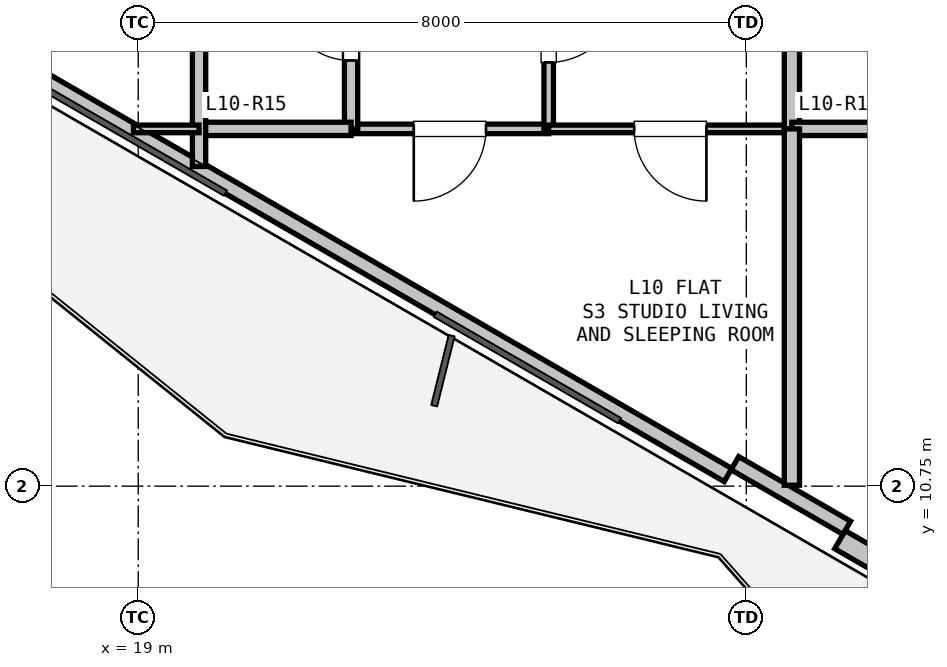
"""IFC4 building model, lengths in metres.
Left out: names, types, materials, properties, quantities, classifications, styles, units other than length and angle.
Written with IfcOpenShell. Run it as: python <this file> out.ifc"""

import sys

from ifc_helpers import new_model, si_unit, direction, frame, frame_2d, origin, place, context, subcontext, project, spatial, rectangle, extrude, element, fill, save


model = new_model("IFC4")
c1 = context("Model", 3, precision=1e-05, world=origin(), true_north=direction((0.0, 1.0)))
c2 = subcontext(c1, "Body", "Model", "MODEL_VIEW")
j1 = project(units=[si_unit("LENGTHUNIT", "METRE"), si_unit("PLANEANGLEUNIT", "RADIAN")], contexts=[c1])
p1 = place(None, origin())
s1 = spatial("IfcSite", under=j1, at=p1, CompositionType="ELEMENT")
p2 = place(p1, origin())
s2 = spatial("IfcBuilding", under=s1, at=p2, CompositionType="ELEMENT")
p3 = place(p2, frame((0.0, 0.0, 39.0)))
s3 = spatial("IfcBuildingStorey", under=s2, at=p3, CompositionType="ELEMENT", Elevation=39.0)
p4 = place(p3, frame((39.207, 3.71, 0.0), z_axis=(0.0, 0.0, 1.0), x_axis=(-0.86603192154, 0.499988710747, 0.0)))
e1 = element("IfcWall", 1, at=p4, inside=s3, PredefinedType="SOLIDWALL", context=c2, shape_type="SweptSolid", body=[
    extrude(rectangle(XDim=12.673, YDim=0.275, at=frame_2d((6.336, 0.0))), origin(), (0.0, 0.0, 1.0), 2.66),
])
p5 = place(p4, frame((8.136, 0.0, 0.0)))
e2 = element("IfcOpeningElement", 2, at=p5, cuts=e1, PredefinedType="OPENING", context=c2, shape_type="SweptSolid", body=[
    extrude(rectangle(XDim=1.1, YDim=2.1, at=frame_2d((0.55, 1.05))), frame((0.0, 0.147, 0.0), z_axis=(0.0, -1.0, 0.0), x_axis=(1.0, 0.0, 0.0)), (0.0, 0.0, 1.0), 0.295),
])
p6 = place(p4, frame((2.971, 0.0, 0.9)))
e3 = element("IfcOpeningElement", 3, at=p6, cuts=e1, PredefinedType="OPENING", context=c2, shape_type="SweptSolid", body=[
    extrude(rectangle(XDim=1.2, YDim=1.4, at=frame_2d((0.6, 0.7))), frame((0.0, 0.147, 0.0), z_axis=(0.0, -1.0, 0.0), x_axis=(1.0, 0.0, 0.0)), (0.0, 0.0, 1.0), 0.295),
])
p7 = place(p3, frame((26.76, 10.896, 0.0), z_axis=(0.0, 0.0, 1.0), x_axis=(-0.866027351828, 0.499996625875, 0.0)))
e4 = element("IfcWall", 4, at=p7, inside=s3, PredefinedType="PARAPET", context=c2, shape_type="SweptSolid", body=[
    extrude(rectangle(XDim=11.973, YDim=0.2, at=frame_2d((5.987, 0.0))), origin(), (0.0, 0.0, 1.0), 0.2),
])
p8 = place(p3, frame((28.322, 10.202, 0.0), z_axis=(0.0, 0.0, 1.0), x_axis=(-0.86605165483, 0.499954529098, 0.0)))
e5 = element("IfcWall", 5, at=p8, inside=s3, PredefinedType="PARAPET", context=c2, shape_type="SweptSolid", body=[
    extrude(rectangle(XDim=1.7, YDim=0.2, at=frame_2d((0.85, 0.0))), origin(), (0.0, 0.0, 1.0), 2.66),
])
p9 = place(p3, frame((24.4, 15.45, 0.0), z_axis=(0.0, 0.0, 1.0), x_axis=(-1.0, 0.0, 0.0)))
e6 = element("IfcWall", 6, at=p9, inside=s3, PredefinedType="PARTITIONING", context=c2, shape_type="SweptSolid", body=[
    extrude(rectangle(XDim=2.6, YDim=0.125, at=frame_2d((1.3, 0.0))), origin(), (0.0, 0.0, 1.0), 3.04),
])
p10 = place(p9, frame((0.825, 0.0, 0.0)))
e7 = element("IfcOpeningElement", 7, at=p10, cuts=e6, PredefinedType="OPENING", context=c2, shape_type="SweptSolid", body=[
    extrude(rectangle(XDim=0.95, YDim=2.1, at=frame_2d((0.475, 1.05))), frame((0.0, 0.073, 0.0), z_axis=(0.0, -1.0, 0.0), x_axis=(1.0, 0.0, 0.0)), (0.0, 0.0, 1.0), 0.145),
])
p11 = place(p3, frame((21.8, 15.45, 0.0), z_axis=(0.0, 0.0, 1.0), x_axis=(0.0, 1.0, 0.0)))
e8 = element("IfcWall", 8, at=p11, inside=s3, PredefinedType="PLUMBINGWALL", context=c2, shape_type="SweptSolid", body=[
    extrude(rectangle(XDim=2.7, YDim=0.175, at=frame_2d((1.35, 0.0))), origin(), (0.0, 0.0, 1.0), 3.04),
])
p12 = place(p11, frame((0.9, 0.0, 0.0)))
e9 = element("IfcOpeningElement", 9, at=p12, cuts=e8, PredefinedType="OPENING", context=c2, shape_type="SweptSolid", body=[
    extrude(rectangle(XDim=0.9, YDim=2.1, at=frame_2d((0.45, 1.05))), frame((0.0, 0.097, 0.0), z_axis=(0.0, -1.0, 0.0), x_axis=(1.0, 0.0, 0.0)), (0.0, 0.0, 1.0), 0.195),
])
p13 = place(p3, frame((24.4, 18.15, 0.0), z_axis=(0.0, 0.0, 1.0), x_axis=(0.0, -1.0, 0.0)))
e10 = element("IfcWall", 10, at=p13, inside=s3, PredefinedType="PARTITIONING", context=c2, shape_type="SweptSolid", body=[
    extrude(rectangle(XDim=2.7, YDim=0.125, at=frame_2d((1.35, 0.0))), origin(), (0.0, 0.0, 1.0), 2.337),
])
p14 = place(p13, frame((0.875, 0.0, 0.0)))
e11 = element("IfcOpeningElement", 11, at=p14, cuts=e10, PredefinedType="OPENING", context=c2, shape_type="SweptSolid", body=[
    extrude(rectangle(XDim=0.95, YDim=2.1, at=frame_2d((0.475, 1.05))), frame((0.0, 0.073, 0.0), z_axis=(0.0, -1.0, 0.0), x_axis=(1.0, 0.0, 0.0)), (0.0, 0.0, 1.0), 0.145),
])
p15 = place(p3, frame((21.8, 15.45, 0.0), z_axis=(0.0, 0.0, 1.0), x_axis=(-1.0, 0.0, 0.0)))
e12 = element("IfcWall", 12, at=p15, inside=s3, PredefinedType="PLUMBINGWALL", context=c2, shape_type="SweptSolid", body=[
    extrude(rectangle(XDim=2.0, YDim=0.175, at=frame_2d((1.0, 0.0))), origin(), (0.0, 0.0, 1.0), 2.365),
])
p16 = place(p3, frame((19.8, 14.956, 0.0), z_axis=(0.0, 0.0, 1.0), x_axis=(0.0, 1.0, 0.0)))
e13 = element("IfcWall", 13, at=p16, inside=s3, PredefinedType="PLUMBINGWALL", context=c2, shape_type="SweptSolid", body=[
    extrude(rectangle(XDim=3.194, YDim=0.175, at=frame_2d((1.597, 0.0))), origin(), (0.0, 0.0, 1.0), 2.365),
])
p17 = place(p3, frame((27.6, 15.45, 0.0), z_axis=(0.0, 0.0, 1.0), x_axis=(-1.0, 0.0, 0.0)))
e14 = element("IfcWall", 14, at=p17, inside=s3, PredefinedType="PARTITIONING", context=c2, shape_type="SweptSolid", body=[
    extrude(rectangle(XDim=3.2, YDim=0.1, at=frame_2d((1.6, 0.0))), origin(), (0.0, 0.0, 1.0), 2.337),
])
p18 = place(p17, frame((1.125, 0.0, 0.0)))
e15 = element("IfcOpeningElement", 15, at=p18, cuts=e14, PredefinedType="OPENING", context=c2, shape_type="SweptSolid", body=[
    extrude(rectangle(XDim=0.95, YDim=2.1, at=frame_2d((0.475, 1.05))), frame((0.0, 0.06, 0.0), z_axis=(0.0, -1.0, 0.0), x_axis=(1.0, 0.0, 0.0)), (0.0, 0.0, 1.0), 0.12),
])
p19 = place(p3, frame((27.6, 18.15, 0.0), z_axis=(0.0, 0.0, 1.0), x_axis=(0.0, -1.0, 0.0)))
e16 = element("IfcWall", 16, at=p19, inside=s3, PredefinedType="PARTITIONING", context=c2, shape_type="SweptSolid", body=[
    extrude(rectangle(XDim=2.7, YDim=0.2, at=frame_2d((1.35, 0.0))), origin(), (0.0, 0.0, 1.0), 3.04),
])
p20 = place(p3, frame((29.6, 15.45, 0.0), z_axis=(0.0, 0.0, 1.0), x_axis=(-1.0, 0.0, 0.0)))
e17 = element("IfcWall", 17, at=p20, inside=s3, PredefinedType="PLUMBINGWALL", context=c2, shape_type="SweptSolid", body=[
    extrude(rectangle(XDim=2.0, YDim=0.175, at=frame_2d((1.0, 0.0))), origin(), (0.0, 0.0, 1.0), 3.04),
])
p21 = place(p3, frame((18.938, 15.45, 0.0), z_axis=(0.0, 0.0, 1.0), x_axis=(1.0, 0.0, 0.0)))
e18 = element("IfcWall", 18, at=p21, inside=s3, PredefinedType="PARTITIONING", context=c2, shape_type="SweptSolid", body=[
    extrude(rectangle(XDim=0.863, YDim=0.1, at=frame_2d((0.431, 0.0))), origin(), (0.0, 0.0, 1.0), 2.65),
])
p22 = place(p3, frame((27.6, 15.45, 0.0), z_axis=(0.0, 0.0, 1.0), x_axis=(0.0, -1.0, 0.0)))
e19 = element("IfcWall", 19, at=p22, inside=s3, PredefinedType="PARTITIONING", context=c2, shape_type="SweptSolid", body=[
    extrude(rectangle(XDim=4.688, YDim=0.2, at=frame_2d((2.344, 0.0))), origin(), (0.0, 0.0, 1.0), 2.337),
])
p23 = place(p12, origin())
e20 = element("IfcDoor", 20, at=p23, inside=s3, OperationType="SINGLE_SWING_RIGHT", PredefinedType="DOOR", context=c2, shape_type="SweptSolid", body=[
    extrude(rectangle(XDim=0.9, YDim=2.1, at=frame_2d((0.45, 1.05))), frame((0.0, 0.025, 0.0), z_axis=(0.0, -1.0, 0.0), x_axis=(1.0, 0.0, 0.0)), (0.0, 0.0, 1.0), 0.05),
])
fill(e9, e20)
p24 = place(p14, origin())
e21 = element("IfcDoor", 21, at=p24, inside=s3, OperationType="SINGLE_SWING_LEFT", PredefinedType="DOOR", context=c2, shape_type="SweptSolid", body=[
    extrude(rectangle(XDim=0.95, YDim=2.1, at=frame_2d((0.475, 1.05))), frame((0.0, 0.025, 0.0), z_axis=(0.0, -1.0, 0.0), x_axis=(1.0, 0.0, 0.0)), (0.0, 0.0, 1.0), 0.05),
])
fill(e11, e21)
p25 = place(p10, origin())
e22 = element("IfcDoor", 22, at=p25, inside=s3, OperationType="SINGLE_SWING_RIGHT", PredefinedType="DOOR", context=c2, shape_type="SweptSolid", body=[
    extrude(rectangle(XDim=0.95, YDim=2.1, at=frame_2d((0.475, 1.05))), frame((0.0, 0.025, 0.0), z_axis=(0.0, -1.0, 0.0), x_axis=(1.0, 0.0, 0.0)), (0.0, 0.0, 1.0), 0.05),
])
fill(e7, e22)
p26 = place(p18, origin())
e23 = element("IfcDoor", 23, at=p26, inside=s3, OperationType="SINGLE_SWING_LEFT", PredefinedType="DOOR", context=c2, shape_type="SweptSolid", body=[
    extrude(rectangle(XDim=0.95, YDim=2.1, at=frame_2d((0.475, 1.05))), frame((0.0, 0.025, 0.0), z_axis=(0.0, -1.0, 0.0), x_axis=(1.0, 0.0, 0.0)), (0.0, 0.0, 1.0), 0.05),
])
fill(e15, e23)
save(model, sys.argv[1])
